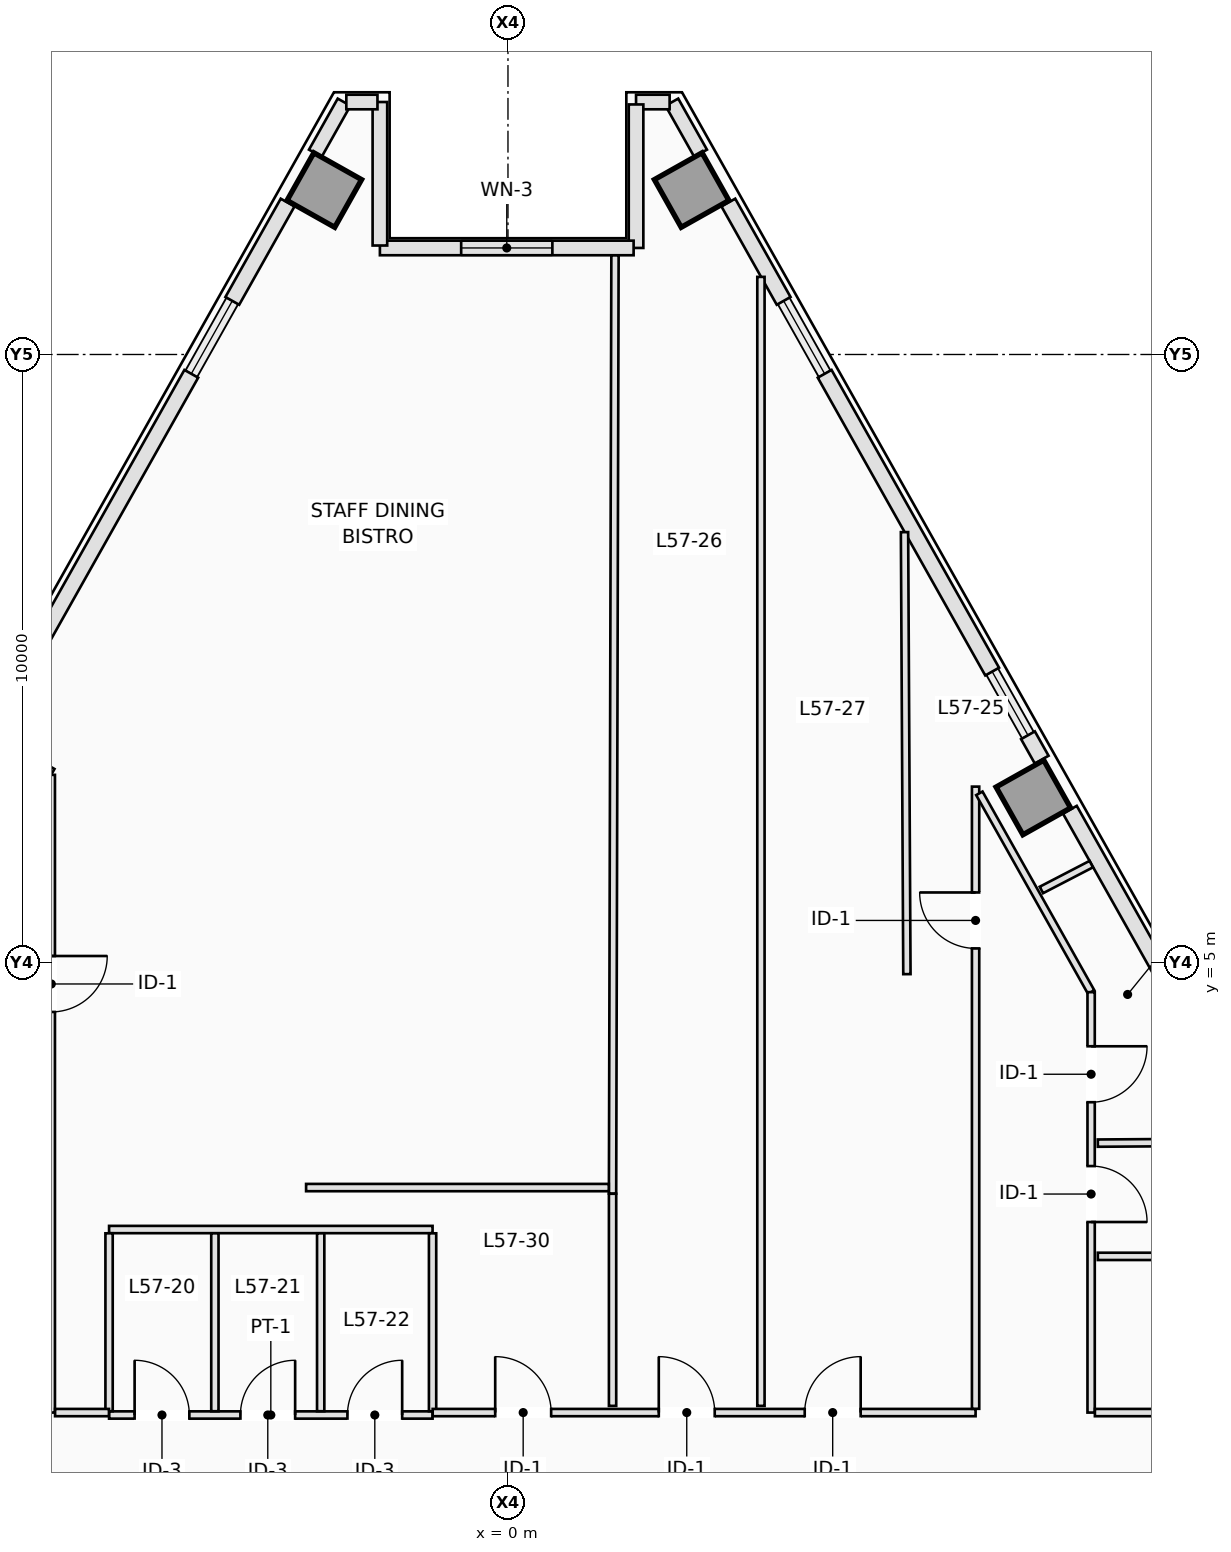
"""IFC4 building model, lengths in metres.
Left out: names, types, materials, properties, quantities, classifications, styles, units other than length and angle.
Written with IfcOpenShell. Run it as: python <this file> out.ifc"""

import sys

from ifc_helpers import new_model, si_unit, direction, frame, frame_2d, origin, origin_2d, place, context, subcontext, project, spatial, rectangle, extrude, element, fill, save


model = new_model("IFC4")
c1 = context("Model", 3, precision=1e-05, world=origin(), true_north=direction((0.0, 1.0)))
c2 = subcontext(c1, "Body", "Model", "MODEL_VIEW")
j1 = project(units=[si_unit("LENGTHUNIT", "METRE"), si_unit("PLANEANGLEUNIT", "RADIAN")], contexts=[c1])
p1 = place(None, origin())
s1 = spatial("IfcSite", under=j1, at=p1, CompositionType="ELEMENT")
p2 = place(p1, origin())
s2 = spatial("IfcBuilding", under=s1, at=p2, CompositionType="ELEMENT")
p3 = place(p2, frame((0.0, 0.0, 207.9)))
s3 = spatial("IfcBuildingStorey", under=s2, at=p3, CompositionType="ELEMENT", Elevation=207.9)
for number, where, z_axis, x_axis in (
    (1, (8.64, 7.715, 0.0), (0.0, 0.0, 1.0), (0.872, 0.49, 0.0)),
    (2, (3.021, 17.704, 0.0), (0.0, 0.0, 1.0), (0.872, 0.49, 0.0)),
    (3, (-3.021, 17.704, 0.0), (0.0, 0.0, 1.0), (-0.872, 0.49, 0.0)),
):
    element("IfcColumn", number, at=place(p3, frame(where, z_axis=z_axis, x_axis=x_axis)), inside=s3, PredefinedType="COLUMN", context=c2, shape_type="SweptSolid", body=[
        extrude(rectangle(XDim=0.9, YDim=0.9, at=origin_2d()), origin(), (0.0, 0.0, 1.0), 3.5),
    ])
p4 = place(p3, frame((2.695, 19.149, 0.0), z_axis=(0.0, 0.0, 1.0), x_axis=(0.490345412687, -0.87152818443, 0.0)))
e4 = element("IfcWall", 4, at=p4, inside=s3, PredefinedType="STANDARD", context=c2, shape_type="SweptSolid", body=[
    extrude(rectangle(XDim=0.964, YDim=0.24, at=frame_2d((0.482, 0.0))), origin(), (0.0, 0.0, 1.0), 3.25),
])
p5 = place(p3, frame((3.624, 17.499, 0.0), z_axis=(0.0, 0.0, 1.0), x_axis=(0.490261239633, -0.871575537125, 0.0)))
e5 = element("IfcWall", 5, at=p5, inside=s3, PredefinedType="STANDARD", context=c2, shape_type="SweptSolid", body=[
    extrude(rectangle(XDim=1.855, YDim=0.26, at=frame_2d((0.928, 0.0))), origin(), (0.0, 0.0, 1.0), 3.25),
])
p6 = place(p3, frame((5.208, 14.682, 0.0), z_axis=(0.0, 0.0, 1.0), x_axis=(0.490240608828, -0.871587141631, 0.0)))
e6 = element("IfcWall", 6, at=p6, inside=s3, PredefinedType="STANDARD", context=c2, shape_type="SweptSolid", body=[
    extrude(rectangle(XDim=5.618, YDim=0.26, at=frame_2d((2.809, 0.0))), origin(), (0.0, 0.0, 1.0), 3.25),
])
p7 = place(p3, frame((8.552, 8.738, 0.0), z_axis=(0.0, 0.0, 1.0), x_axis=(0.490412424957, -0.871490478116, 0.0)))
e7 = element("IfcWall", 7, at=p7, inside=s3, PredefinedType="STANDARD", context=c2, shape_type="SweptSolid", body=[
    extrude(rectangle(XDim=0.46, YDim=0.26, at=frame_2d((0.23, 0.0))), origin(), (0.0, 0.0, 1.0), 3.25),
])
p8 = place(p3, frame((9.24, 7.514, 0.0), z_axis=(0.0, 0.0, 1.0), x_axis=(0.490237464814, -0.871588910033, 0.0)))
e8 = element("IfcWall", 8, at=p8, inside=s3, PredefinedType="STANDARD", context=c2, shape_type="SweptSolid", body=[
    extrude(rectangle(XDim=4.388, YDim=0.26, at=frame_2d((2.194, 0.0))), origin(), (0.0, 0.0, 1.0), 3.25),
])
p9 = place(p3, frame((-3.168, 18.309, 0.0), z_axis=(0.0, 0.0, 1.0), x_axis=(0.490345412687, 0.87152818443, 0.0)))
e9 = element("IfcWall", 9, at=p9, inside=s3, PredefinedType="STANDARD", context=c2, shape_type="SweptSolid", body=[
    extrude(rectangle(XDim=0.964, YDim=0.24, at=frame_2d((0.482, 0.0))), origin(), (0.0, 0.0, 1.0), 3.25),
])
p10 = place(p3, frame((-7.962, 9.785, 0.0), z_axis=(0.0, 0.0, 1.0), x_axis=(0.490240608828, 0.871587141631, 0.0)))
e10 = element("IfcWall", 10, at=p10, inside=s3, PredefinedType="STANDARD", context=c2, shape_type="SweptSolid", body=[
    extrude(rectangle(XDim=5.618, YDim=0.26, at=frame_2d((2.809, 0.0))), origin(), (0.0, 0.0, 1.0), 3.25),
])
p11 = place(p3, frame((-4.533, 15.882, 0.0), z_axis=(0.0, 0.0, 1.0), x_axis=(0.490261239633, 0.871575537125, 0.0)))
e11 = element("IfcWall", 11, at=p11, inside=s3, PredefinedType="STANDARD", context=c2, shape_type="SweptSolid", body=[
    extrude(rectangle(XDim=1.855, YDim=0.26, at=frame_2d((0.928, 0.0))), origin(), (0.0, 0.0, 1.0), 3.25),
])
p12 = place(p3, frame((2.658, 19.152, 0.0), z_axis=(0.0, 0.0, 1.0), x_axis=(-1.0, 0.0, 0.0)))
e12 = element("IfcWall", 12, at=p12, inside=s3, PredefinedType="STANDARD", context=c2, shape_type="SweptSolid", body=[
    extrude(rectangle(XDim=0.552, YDim=0.24, at=frame_2d((0.276, 0.0))), origin(), (0.0, 0.0, 1.0), 3.25),
])
p13 = place(p3, frame((2.106, 19.112, 0.0), z_axis=(0.0, 0.0, 1.0), x_axis=(0.0, -1.0, 0.0)))
e13 = element("IfcWall", 13, at=p13, inside=s3, PredefinedType="STANDARD", context=c2, shape_type="SweptSolid", body=[
    extrude(rectangle(XDim=2.36, YDim=0.24, at=frame_2d((1.18, 0.0))), origin(), (0.0, 0.0, 1.0), 3.25),
])
p14 = place(p3, frame((2.066, 16.752, 0.0), z_axis=(0.0, 0.0, 1.0), x_axis=(-1.0, 0.0, 0.0)))
e14 = element("IfcWall", 14, at=p14, inside=s3, PredefinedType="STANDARD", context=c2, shape_type="SweptSolid", body=[
    extrude(rectangle(XDim=4.172, YDim=0.24, at=frame_2d((2.086, 0.0))), origin(), (0.0, 0.0, 1.0), 3.25),
])
p15 = place(p14, frame((1.336, 0.0, 0.9)))
e15 = element("IfcOpeningElement", 15, at=p15, cuts=e14, PredefinedType="OPENING", context=c2, shape_type="SweptSolid", body=[
    extrude(rectangle(XDim=1.5, YDim=1.95, at=frame_2d((0.75, 0.975))), frame((0.0, 0.13, 0.0), z_axis=(0.0, -1.0, 0.0), x_axis=(1.0, 0.0, 0.0)), (0.0, 0.0, 1.0), 0.26),
])
p16 = place(p3, frame((-2.106, 16.792, 0.0), z_axis=(0.0, 0.0, 1.0), x_axis=(0.0, 1.0, 0.0)))
e16 = element("IfcWall", 16, at=p16, inside=s3, PredefinedType="STANDARD", context=c2, shape_type="SweptSolid", body=[
    extrude(rectangle(XDim=2.36, YDim=0.24, at=frame_2d((1.18, 0.0))), origin(), (0.0, 0.0, 1.0), 3.25),
])
p17 = place(p3, frame((-2.146, 19.152, 0.0), z_axis=(0.0, 0.0, 1.0), x_axis=(-1.0, 0.0, 0.0)))
e17 = element("IfcWall", 17, at=p17, inside=s3, PredefinedType="STANDARD", context=c2, shape_type="SweptSolid", body=[
    extrude(rectangle(XDim=0.512, YDim=0.24, at=frame_2d((0.256, 0.0))), origin(), (0.0, 0.0, 1.0), 3.25),
])
p18 = place(p3, frame((-6.56, -2.44, 0.0), z_axis=(0.0, 0.0, 1.0), x_axis=(1.0, 0.0, 0.0)))
e18 = element("IfcWall", 18, at=p18, inside=s3, PredefinedType="PARTITIONING", context=c2, shape_type="SweptSolid", body=[
    extrude(rectangle(XDim=5.32, YDim=0.12, at=frame_2d((2.66, 0.0))), origin(), (0.0, 0.0, 1.0), 2.943),
])
p19 = place(p18, frame((0.42, 0.0, 0.0)))
e19 = element("IfcOpeningElement", 19, at=p19, cuts=e18, PredefinedType="OPENING", context=c2, shape_type="SweptSolid", body=[
    extrude(rectangle(XDim=0.9, YDim=2.12, at=frame_2d((0.45, 1.06))), frame((0.0, 0.07, 0.0), z_axis=(0.0, -1.0, 0.0), x_axis=(1.0, 0.0, 0.0)), (0.0, 0.0, 1.0), 0.14),
])
p20 = place(p18, frame((2.16, 0.0, 0.0)))
e20 = element("IfcOpeningElement", 20, at=p20, cuts=e18, PredefinedType="OPENING", context=c2, shape_type="SweptSolid", body=[
    extrude(rectangle(XDim=0.9, YDim=2.12, at=frame_2d((0.45, 1.06))), frame((0.0, 0.07, 0.0), z_axis=(0.0, -1.0, 0.0), x_axis=(1.0, 0.0, 0.0)), (0.0, 0.0, 1.0), 0.14),
])
p21 = place(p18, frame((3.92, 0.0, 0.0)))
e21 = element("IfcOpeningElement", 21, at=p21, cuts=e18, PredefinedType="OPENING", context=c2, shape_type="SweptSolid", body=[
    extrude(rectangle(XDim=0.9, YDim=2.12, at=frame_2d((0.45, 1.06))), frame((0.0, 0.07, 0.0), z_axis=(0.0, -1.0, 0.0), x_axis=(1.0, 0.0, 0.0)), (0.0, 0.0, 1.0), 0.14),
])
p22 = place(p3, frame((-6.56, 0.61, 0.0), z_axis=(0.0, 0.0, 1.0), x_axis=(1.0, 0.0, 0.0)))
e22 = element("IfcWall", 22, at=p22, inside=s3, PredefinedType="PARTITIONING", context=c2, shape_type="SweptSolid", body=[
    extrude(rectangle(XDim=5.32, YDim=0.12, at=frame_2d((2.66, 0.0))), origin(), (0.0, 0.0, 1.0), 3.25),
])
for number, where, z_axis, x_axis in (
    (23, (-6.56, -2.378, 0.0), (0.0, 0.0, 1.0), (0.0, 1.0, 0.0)),
    (24, (-4.82, -2.378, 0.0), (0.0, 0.0, 1.0), (0.0, 1.0, 0.0)),
    (25, (-3.08, -2.378, 0.0), (0.0, 0.0, 1.0), (0.0, 1.0, 0.0)),
    (26, (-1.24, -2.378, 0.0), (0.0, 0.0, 1.0), (0.0, 1.0, 0.0)),
):
    element("IfcWall", number, at=place(p3, frame(where, z_axis=z_axis, x_axis=x_axis)), inside=s3, PredefinedType="PARTITIONING", context=c2, shape_type="SweptSolid", body=[
        extrude(rectangle(XDim=2.926, YDim=0.12, at=frame_2d((1.463, 0.0))), origin(), (0.0, 0.0, 1.0), 3.25),
    ])
p23 = place(p3, frame((-9.409, 4.838, 0.0), z_axis=(0.0, 0.0, 1.0), x_axis=(0.490276203052, 0.871567120032, 0.0)))
e27 = element("IfcWall", 27, at=p23, inside=s3, PredefinedType="PARTITIONING", context=c2, shape_type="SweptSolid", body=[
    extrude(rectangle(XDim=3.873, YDim=0.12, at=frame_2d((1.937, 0.0))), origin(), (0.0, 0.0, 1.0), 3.25),
])
p24 = place(p3, frame((-7.51, 8.087, 0.0), z_axis=(0.0, 0.0, 1.0), x_axis=(0.0, -1.0, 0.0)))
e28 = element("IfcWall", 28, at=p24, inside=s3, PredefinedType="PARTITIONING", context=c2, shape_type="SweptSolid", body=[
    extrude(rectangle(XDim=10.487, YDim=0.12, at=frame_2d((5.244, 0.0))), origin(), (0.0, 0.0, 1.0), 3.25),
])
p25 = place(p24, frame((2.979, 0.0, 0.0)))
e29 = element("IfcOpeningElement", 29, at=p25, cuts=e28, PredefinedType="OPENING", context=c2, shape_type="SweptSolid", body=[
    extrude(rectangle(XDim=0.92, YDim=2.12, at=frame_2d((0.46, 1.06))), frame((0.0, 0.07, 0.0), z_axis=(0.0, -1.0, 0.0), x_axis=(1.0, 0.0, 0.0)), (0.0, 0.0, 1.0), 0.14),
])
p26 = place(p3, frame((-7.448, -2.4, 0.0), z_axis=(0.0, 0.0, 1.0), x_axis=(1.0, 0.0, 0.0)))
e30 = element("IfcWall", 30, at=p26, inside=s3, PredefinedType="PARTITIONING", context=c2, shape_type="SweptSolid", body=[
    extrude(rectangle(XDim=0.886, YDim=0.12, at=frame_2d((0.443, 0.0))), origin(), (0.0, 0.0, 1.0), 3.25),
])
p27 = place(p3, frame((-1.238, -2.4, 0.0), z_axis=(0.0, 0.0, 1.0), x_axis=(1.0, 0.0, 0.0)))
e31 = element("IfcWall", 31, at=p27, inside=s3, PredefinedType="PARTITIONING", context=c2, shape_type="SweptSolid", body=[
    extrude(rectangle(XDim=8.928, YDim=0.12, at=frame_2d((4.464, 0.0))), origin(), (0.0, 0.0, 1.0), 2.943),
])
p28 = place(p27, frame((3.718, 0.0, 0.0)))
e32 = element("IfcOpeningElement", 32, at=p28, cuts=e31, PredefinedType="OPENING", context=c2, shape_type="SweptSolid", body=[
    extrude(rectangle(XDim=0.92, YDim=2.12, at=frame_2d((0.46, 1.06))), frame((0.0, 0.07, 0.0), z_axis=(0.0, -1.0, 0.0), x_axis=(1.0, 0.0, 0.0)), (0.0, 0.0, 1.0), 0.14),
])
p29 = place(p27, frame((6.118, 0.0, 0.0)))
e33 = element("IfcOpeningElement", 33, at=p29, cuts=e31, PredefinedType="OPENING", context=c2, shape_type="SweptSolid", body=[
    extrude(rectangle(XDim=0.92, YDim=2.12, at=frame_2d((0.46, 1.06))), frame((0.0, 0.07, 0.0), z_axis=(0.0, -1.0, 0.0), x_axis=(1.0, 0.0, 0.0)), (0.0, 0.0, 1.0), 0.14),
])
p30 = place(p27, frame((1.028, 0.0, 0.0)))
e34 = element("IfcOpeningElement", 34, at=p30, cuts=e31, PredefinedType="OPENING", context=c2, shape_type="SweptSolid", body=[
    extrude(rectangle(XDim=0.92, YDim=2.12, at=frame_2d((0.46, 1.06))), frame((0.0, 0.07, 0.0), z_axis=(0.0, -1.0, 0.0), x_axis=(1.0, 0.0, 0.0)), (0.0, 0.0, 1.0), 0.14),
])
p31 = place(p3, frame((7.69, -2.338, 0.0), z_axis=(0.0, 0.0, 1.0), x_axis=(0.0, 1.0, 0.0)))
e35 = element("IfcWall", 35, at=p31, inside=s3, PredefinedType="PARTITIONING", context=c2, shape_type="SweptSolid", body=[
    extrude(rectangle(XDim=10.232, YDim=0.12, at=frame_2d((5.116, 0.0))), origin(), (0.0, 0.0, 1.0), 3.25),
])
p32 = place(p31, frame((7.571, 0.0, 0.0)))
e36 = element("IfcOpeningElement", 36, at=p32, cuts=e35, PredefinedType="OPENING", context=c2, shape_type="SweptSolid", body=[
    extrude(rectangle(XDim=0.92, YDim=2.12, at=frame_2d((0.46, 1.06))), frame((0.0, 0.07, 0.0), z_axis=(0.0, -1.0, 0.0), x_axis=(1.0, 0.0, 0.0)), (0.0, 0.0, 1.0), 0.14),
])
p33 = place(p3, frame((7.752, 7.783, 0.0), z_axis=(0.0, 0.0, 1.0), x_axis=(0.490285973315, -0.871561623966, 0.0)))
e37 = element("IfcWall", 37, at=p33, inside=s3, PredefinedType="PARTITIONING", context=c2, shape_type="SweptSolid", body=[
    extrude(rectangle(XDim=3.749, YDim=0.12, at=frame_2d((1.875, 0.0))), origin(), (0.0, 0.0, 1.0), 3.25),
])
p34 = place(p3, frame((9.59, 4.514, 0.0), z_axis=(0.0, 0.0, 1.0), x_axis=(0.0, -1.0, 0.0)))
e38 = element("IfcWall", 38, at=p34, inside=s3, PredefinedType="PARTITIONING", context=c2, shape_type="SweptSolid", body=[
    extrude(rectangle(XDim=6.914, YDim=0.12, at=frame_2d((3.457, 0.0))), origin(), (0.0, 0.0, 1.0), 3.25),
])
p35 = place(p34, frame((0.89, 0.0, 0.0)))
e39 = element("IfcOpeningElement", 39, at=p35, cuts=e38, PredefinedType="OPENING", context=c2, shape_type="SweptSolid", body=[
    extrude(rectangle(XDim=0.92, YDim=2.12, at=frame_2d((0.46, 1.06))), frame((0.0, 0.07, 0.0), z_axis=(0.0, -1.0, 0.0), x_axis=(1.0, 0.0, 0.0)), (0.0, 0.0, 1.0), 0.14),
])
p36 = place(p34, frame((2.86, 0.0, 0.0)))
e40 = element("IfcOpeningElement", 40, at=p36, cuts=e38, PredefinedType="OPENING", context=c2, shape_type="SweptSolid", body=[
    extrude(rectangle(XDim=0.92, YDim=2.12, at=frame_2d((0.46, 1.06))), frame((0.0, 0.07, 0.0), z_axis=(0.0, -1.0, 0.0), x_axis=(1.0, 0.0, 0.0)), (0.0, 0.0, 1.0), 0.14),
])
p37 = place(p3, frame((9.652, -2.4, 0.0), z_axis=(0.0, 0.0, 1.0), x_axis=(1.0, 0.0, 0.0)))
e41 = element("IfcWall", 41, at=p37, inside=s3, PredefinedType="PARTITIONING", context=c2, shape_type="SweptSolid", body=[
    extrude(rectangle(XDim=2.758, YDim=0.12, at=frame_2d((1.379, 0.0))), origin(), (0.0, 0.0, 1.0), 3.25),
])
p38 = place(p3, frame((1.76, 16.63, 0.0), z_axis=(0.0, 0.0, 1.0), x_axis=(-0.002610750596, -0.999996591985, 0.0)))
e42 = element("IfcWall", 42, at=p38, inside=s3, PredefinedType="PARTITIONING", context=c2, shape_type="SweptSolid", body=[
    extrude(rectangle(XDim=15.43, YDim=0.12, at=frame_2d((7.715, 0.0))), origin(), (0.0, 0.0, 1.0), 3.25),
])
p39 = place(p3, frame((1.658, 1.3, 0.0), z_axis=(0.0, 0.0, 1.0), x_axis=(-1.0, 0.0, 0.0)))
e43 = element("IfcWall", 43, at=p39, inside=s3, PredefinedType="PARTITIONING", context=c2, shape_type="SweptSolid", body=[
    extrude(rectangle(XDim=4.978, YDim=0.12, at=frame_2d((2.489, 0.0))), origin(), (0.0, 0.0, 1.0), 2.943),
])
p40 = place(p3, frame((6.561, 4.81, 0.0), z_axis=(0.0, 0.0, 1.0), x_axis=(-0.005441090986, 0.999985197155, 0.0)))
e44 = element("IfcWall", 44, at=p40, inside=s3, PredefinedType="PARTITIONING", context=c2, shape_type="SweptSolid", body=[
    extrude(rectangle(XDim=7.269, YDim=0.12, at=frame_2d((3.634, 0.0))), origin(), (0.0, 0.0, 1.0), 3.25),
])
p41 = place(p3, frame((9.592, 6.619, 0.0), z_axis=(0.0, 0.0, 1.0), x_axis=(-0.887774537441, -0.460278579418, 0.0)))
e45 = element("IfcWall", 45, at=p41, inside=s3, PredefinedType="PARTITIONING", context=c2, shape_type="SweptSolid", body=[
    extrude(rectangle(XDim=0.923, YDim=0.12, at=frame_2d((0.462, 0.0))), origin(), (0.0, 0.0, 1.0), 3.25),
])
p42 = place(p3, frame((4.16, 16.276, 0.0), z_axis=(0.0, 0.0, 1.0), x_axis=(0.0, -1.0, 0.0)))
e46 = element("IfcWall", 46, at=p42, inside=s3, PredefinedType="PARTITIONING", context=c2, shape_type="SweptSolid", body=[
    extrude(rectangle(XDim=18.566, YDim=0.12, at=frame_2d((9.283, 0.0))), origin(), (0.0, 0.0, 1.0), 3.25),
])
p43 = place(p3, frame((1.72, -2.29, 0.0), z_axis=(0.0, 0.0, 1.0), x_axis=(0.0, 1.0, 0.0)))
e47 = element("IfcWall", 47, at=p43, inside=s3, PredefinedType="PARTITIONING", context=c2, shape_type="SweptSolid", body=[
    extrude(rectangle(XDim=3.488, YDim=0.12, at=frame_2d((1.744, 0.0))), origin(), (0.0, 0.0, 1.0), 3.25),
])
p44 = place(p3, frame((12.164, 2.048, 0.0), z_axis=(0.0, 0.0, 1.0), x_axis=(-0.999976623228, -0.006837616391, 0.0)))
e48 = element("IfcWall", 48, at=p44, inside=s3, PredefinedType="PARTITIONING", context=c2, shape_type="SweptSolid", body=[
    extrude(rectangle(XDim=2.464, YDim=0.12, at=frame_2d((1.232, 0.0))), origin(), (0.0, 0.0, 1.0), 3.25),
])
p45 = place(p3, frame((13.22, 0.169, 0.0), z_axis=(0.0, 0.0, 1.0), x_axis=(-1.0, 0.0, 0.0)))
e49 = element("IfcWall", 49, at=p45, inside=s3, PredefinedType="PARTITIONING", context=c2, shape_type="SweptSolid", body=[
    extrude(rectangle(XDim=3.521, YDim=0.12, at=frame_2d((1.76, 0.0))), origin(), (0.0, 0.0, 1.0), 3.25),
])
p46 = place(p15, origin())
e50 = element("IfcWindow", 50, at=p46, inside=s3, PartitioningType="SINGLE_PANEL", PredefinedType="WINDOW", context=c2, shape_type="SweptSolid", body=[
    extrude(rectangle(XDim=1.5, YDim=1.95, at=frame_2d((0.75, 0.975))), frame((0.0, 0.03, 0.0), z_axis=(0.0, -1.0, 0.0), x_axis=(1.0, 0.0, 0.0)), (0.0, 0.0, 1.0), 0.06),
])
fill(e15, e50)
p47 = place(p19, origin())
e51 = element("IfcDoor", 51, at=p47, inside=s3, OperationType="SINGLE_SWING_LEFT", PredefinedType="DOOR", context=c2, shape_type="SweptSolid", body=[
    extrude(rectangle(XDim=0.9, YDim=2.12, at=frame_2d((0.45, 1.06))), frame((0.0, 0.025, 0.0), z_axis=(0.0, -1.0, 0.0), x_axis=(1.0, 0.0, 0.0)), (0.0, 0.0, 1.0), 0.05),
])
fill(e19, e51)
p48 = place(p20, origin())
e52 = element("IfcDoor", 52, at=p48, inside=s3, OperationType="SINGLE_SWING_RIGHT", PredefinedType="DOOR", context=c2, shape_type="SweptSolid", body=[
    extrude(rectangle(XDim=0.9, YDim=2.12, at=frame_2d((0.45, 1.06))), frame((0.0, 0.025, 0.0), z_axis=(0.0, -1.0, 0.0), x_axis=(1.0, 0.0, 0.0)), (0.0, 0.0, 1.0), 0.05),
])
fill(e20, e52)
p49 = place(p21, origin())
e53 = element("IfcDoor", 53, at=p49, inside=s3, OperationType="SINGLE_SWING_RIGHT", PredefinedType="DOOR", context=c2, shape_type="SweptSolid", body=[
    extrude(rectangle(XDim=0.9, YDim=2.12, at=frame_2d((0.45, 1.06))), frame((0.0, 0.025, 0.0), z_axis=(0.0, -1.0, 0.0), x_axis=(1.0, 0.0, 0.0)), (0.0, 0.0, 1.0), 0.05),
])
fill(e21, e53)
p50 = place(p25, origin())
e54 = element("IfcDoor", 54, at=p50, inside=s3, OperationType="SINGLE_SWING_LEFT", PredefinedType="DOOR", context=c2, shape_type="SweptSolid", body=[
    extrude(rectangle(XDim=0.92, YDim=2.12, at=frame_2d((0.46, 1.06))), frame((0.0, 0.025, 0.0), z_axis=(0.0, -1.0, 0.0), x_axis=(1.0, 0.0, 0.0)), (0.0, 0.0, 1.0), 0.05),
])
fill(e29, e54)
p51 = place(p32, origin())
e55 = element("IfcDoor", 55, at=p51, inside=s3, OperationType="SINGLE_SWING_RIGHT", PredefinedType="DOOR", context=c2, shape_type="SweptSolid", body=[
    extrude(rectangle(XDim=0.92, YDim=2.12, at=frame_2d((0.46, 1.06))), frame((0.0, 0.025, 0.0), z_axis=(0.0, -1.0, 0.0), x_axis=(1.0, 0.0, 0.0)), (0.0, 0.0, 1.0), 0.05),
])
fill(e36, e55)
p52 = place(p28, origin())
e56 = element("IfcDoor", 56, at=p52, inside=s3, OperationType="SINGLE_SWING_LEFT", PredefinedType="DOOR", context=c2, shape_type="SweptSolid", body=[
    extrude(rectangle(XDim=0.92, YDim=2.12, at=frame_2d((0.46, 1.06))), frame((0.0, 0.025, 0.0), z_axis=(0.0, -1.0, 0.0), x_axis=(1.0, 0.0, 0.0)), (0.0, 0.0, 1.0), 0.05),
])
fill(e32, e56)
p53 = place(p29, origin())
e57 = element("IfcDoor", 57, at=p53, inside=s3, OperationType="SINGLE_SWING_RIGHT", PredefinedType="DOOR", context=c2, shape_type="SweptSolid", body=[
    extrude(rectangle(XDim=0.92, YDim=2.12, at=frame_2d((0.46, 1.06))), frame((0.0, 0.025, 0.0), z_axis=(0.0, -1.0, 0.0), x_axis=(1.0, 0.0, 0.0)), (0.0, 0.0, 1.0), 0.05),
])
fill(e33, e57)
p54 = place(p35, origin())
e58 = element("IfcDoor", 58, at=p54, inside=s3, OperationType="SINGLE_SWING_LEFT", PredefinedType="DOOR", context=c2, shape_type="SweptSolid", body=[
    extrude(rectangle(XDim=0.92, YDim=2.12, at=frame_2d((0.46, 1.06))), frame((0.0, 0.025, 0.0), z_axis=(0.0, -1.0, 0.0), x_axis=(1.0, 0.0, 0.0)), (0.0, 0.0, 1.0), 0.05),
])
fill(e39, e58)
p55 = place(p36, origin())
e59 = element("IfcDoor", 59, at=p55, inside=s3, OperationType="SINGLE_SWING_RIGHT", PredefinedType="DOOR", context=c2, shape_type="SweptSolid", body=[
    extrude(rectangle(XDim=0.92, YDim=2.12, at=frame_2d((0.46, 1.06))), frame((0.0, 0.025, 0.0), z_axis=(0.0, -1.0, 0.0), x_axis=(1.0, 0.0, 0.0)), (0.0, 0.0, 1.0), 0.05),
])
fill(e40, e59)
p56 = place(p30, origin())
e60 = element("IfcDoor", 60, at=p56, inside=s3, OperationType="SINGLE_SWING_LEFT", PredefinedType="DOOR", context=c2, shape_type="SweptSolid", body=[
    extrude(rectangle(XDim=0.92, YDim=2.12, at=frame_2d((0.46, 1.06))), frame((0.0, 0.025, 0.0), z_axis=(0.0, -1.0, 0.0), x_axis=(1.0, 0.0, 0.0)), (0.0, 0.0, 1.0), 0.05),
])
fill(e34, e60)
save(model, sys.argv[1])
